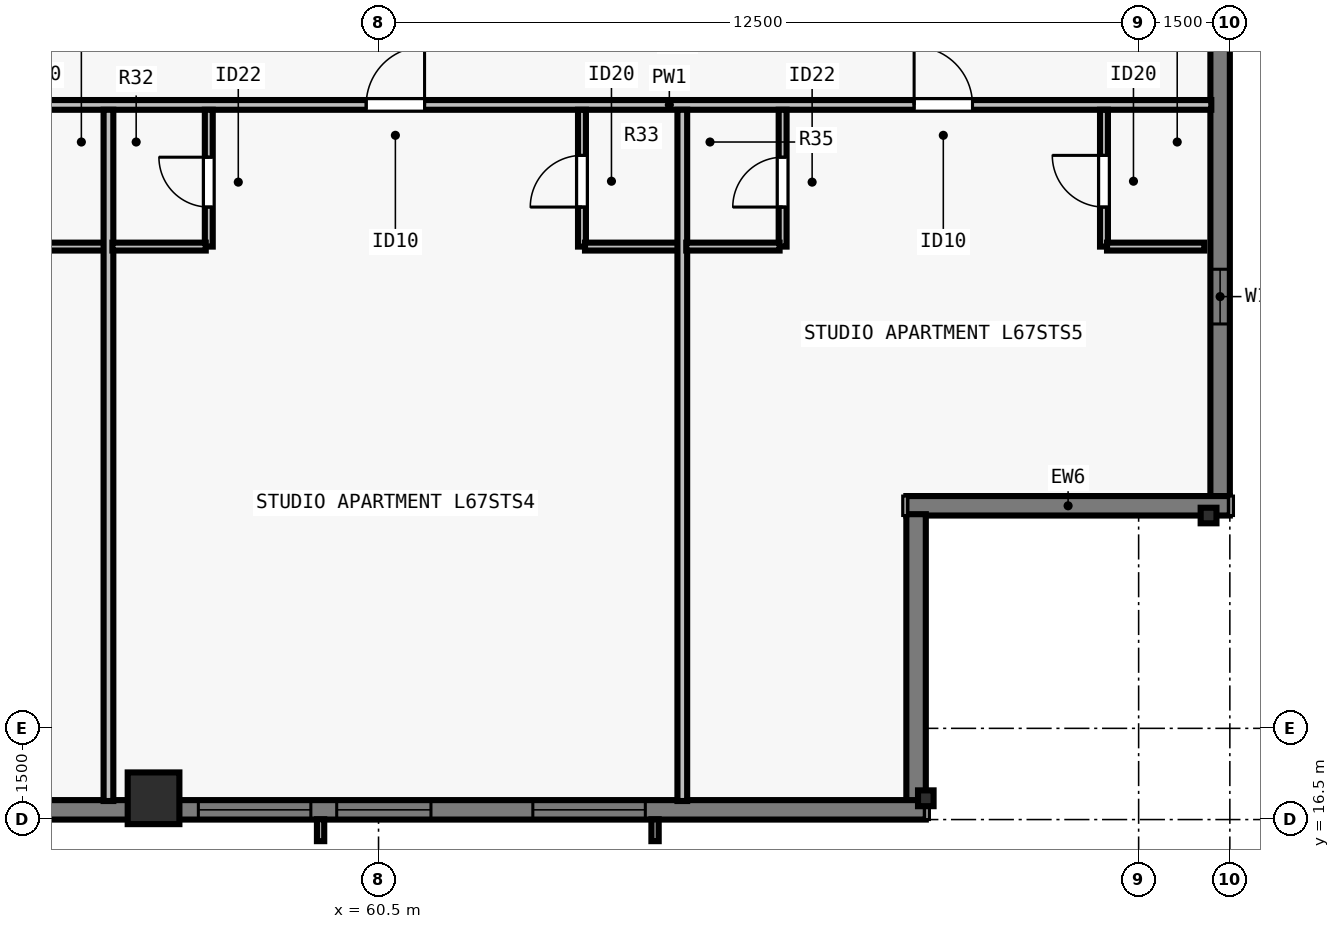
"""IFC4 building model, lengths in metres.
Left out: names, types, materials, properties, quantities, classifications, styles, units other than length and angle.
Written with IfcOpenShell. Run it as: python <this file> out.ifc"""

import sys

from ifc_helpers import new_model, si_unit, direction, frame, frame_2d, origin, origin_2d, place, context, subcontext, project, spatial, rectangle, i_section, extrude, element, fill, save


model = new_model("IFC4")
c1 = context("Model", 3, precision=1e-05, world=origin(), true_north=direction((0.0, 1.0)))
c2 = subcontext(c1, "Body", "Model", "MODEL_VIEW")
j1 = project(units=[si_unit("LENGTHUNIT", "METRE"), si_unit("PLANEANGLEUNIT", "RADIAN")], contexts=[c1])
p1 = place(None, origin())
s1 = spatial("IfcSite", under=j1, at=p1, CompositionType="ELEMENT")
p2 = place(p1, origin())
s2 = spatial("IfcBuilding", under=s1, at=p2, CompositionType="ELEMENT")
p3 = place(p2, frame((0.0, 0.0, 244.5)))
s3 = spatial("IfcBuildingStorey", under=s2, at=p3, CompositionType="ELEMENT", Elevation=244.5)
p4 = place(p3, frame((56.8, 16.85, 0.0), z_axis=(0.0, 0.0, 1.0), x_axis=(1.0, 0.0, 0.0)))
e1 = element("IfcColumn", 1, at=p4, inside=s3, PredefinedType="COLUMN", context=c2, shape_type="SweptSolid", body=[
    extrude(rectangle(XDim=0.85, YDim=0.85, at=origin_2d()), origin(), (0.0, 0.0, 1.0), 3.5),
])
for number, where, z_axis, x_axis in (
    (2, (69.5, 16.85, 0.0), (0.0, 0.0, 1.0), (1.0, 0.0, 0.0)),
    (3, (74.15, 21.5, 0.0), (0.0, 0.0, 1.0), (0.0, 1.0, 0.0)),
):
    element("IfcColumn", number, at=place(p3, frame(where, z_axis=z_axis, x_axis=x_axis)), inside=s3, PredefinedType="COLUMN", context=c2, shape_type="SweptSolid", body=[
        extrude(i_section(OverallWidth=0.256, OverallDepth=0.26, WebThickness=0.01, FlangeThickness=0.017, FilletRadius=0.013, at=origin_2d()), origin(), (0.0, 0.0, 1.0), 3.5),
    ])
p5 = place(p3, frame((74.34, 56.5, 0.0), z_axis=(0.0, 0.0, 1.0), x_axis=(0.0, -1.0, 0.0)))
e4 = element("IfcWall", 4, at=p5, inside=s3, PredefinedType="SOLIDWALL", context=c2, shape_type="SweptSolid", body=[
    extrude(rectangle(XDim=34.702, YDim=0.32, at=frame_2d((17.351, 0.0))), origin(), (0.0, 0.0, 1.0), 3.29),
])
p6 = place(p5, frame((9.388, 0.0, 0.8)))
e5 = element("IfcOpeningElement", 5, at=p6, cuts=e4, PredefinedType="OPENING", context=c2, shape_type="SweptSolid", body=[
    extrude(rectangle(XDim=1.55, YDim=1.678, at=frame_2d((0.775, 0.839))), frame((0.0, 0.17, 0.0), z_axis=(0.0, -1.0, 0.0), x_axis=(1.0, 0.0, 0.0)), (0.0, 0.0, 1.0), 0.34),
])
p7 = place(p5, frame((14.038, 0.0, 0.8)))
e6 = element("IfcOpeningElement", 6, at=p7, cuts=e4, PredefinedType="OPENING", context=c2, shape_type="SweptSolid", body=[
    extrude(rectangle(XDim=1.55, YDim=1.678, at=frame_2d((0.775, 0.839))), frame((0.0, 0.17, 0.0), z_axis=(0.0, -1.0, 0.0), x_axis=(1.0, 0.0, 0.0)), (0.0, 0.0, 1.0), 0.34),
])
p8 = place(p5, frame((18.114, 0.0, 0.8)))
e7 = element("IfcOpeningElement", 7, at=p8, cuts=e4, PredefinedType="OPENING", context=c2, shape_type="SweptSolid", body=[
    extrude(rectangle(XDim=1.85, YDim=1.678, at=frame_2d((0.925, 0.839))), frame((0.0, 0.17, 0.0), z_axis=(0.0, -1.0, 0.0), x_axis=(1.0, 0.0, 0.0)), (0.0, 0.0, 1.0), 0.34),
])
p9 = place(p5, frame((23.614, 0.0, 0.8)))
e8 = element("IfcOpeningElement", 8, at=p9, cuts=e4, PredefinedType="OPENING", context=c2, shape_type="SweptSolid", body=[
    extrude(rectangle(XDim=1.85, YDim=1.678, at=frame_2d((0.925, 0.839))), frame((0.0, 0.17, 0.0), z_axis=(0.0, -1.0, 0.0), x_axis=(1.0, 0.0, 0.0)), (0.0, 0.0, 1.0), 0.34),
])
p10 = place(p5, frame((30.95, 0.0, 0.8)))
e9 = element("IfcOpeningElement", 9, at=p10, cuts=e4, PredefinedType="OPENING", context=c2, shape_type="SweptSolid", body=[
    extrude(rectangle(XDim=0.9, YDim=1.678, at=frame_2d((0.45, 0.839))), frame((0.0, 0.17, 0.0), z_axis=(0.0, -1.0, 0.0), x_axis=(1.0, 0.0, 0.0)), (0.0, 0.0, 1.0), 0.34),
])
p11 = place(p3, frame((74.5, 21.66, 0.0), z_axis=(0.0, 0.0, 1.0), x_axis=(-1.0, 0.0, 0.0)))
e10 = element("IfcWall", 10, at=p11, inside=s3, PredefinedType="SOLIDWALL", context=c2, shape_type="SweptSolid", body=[
    extrude(rectangle(XDim=5.32, YDim=0.32, at=frame_2d((2.66, 0.0))), origin(), (0.0, 0.0, 1.0), 3.29),
])
p12 = place(p3, frame((69.34, 21.522, 0.0), z_axis=(0.0, 0.0, 1.0), x_axis=(0.0, -1.0, 0.0)))
e11 = element("IfcWall", 11, at=p12, inside=s3, PredefinedType="SOLIDWALL", context=c2, shape_type="SweptSolid", body=[
    extrude(rectangle(XDim=4.724, YDim=0.32, at=frame_2d((2.362, 0.0))), origin(), (0.0, 0.0, 1.0), 3.29),
])
p13 = place(p3, frame((69.5, 16.66, 0.0), z_axis=(0.0, 0.0, 1.0), x_axis=(-1.0, 0.0, 0.0)))
e12 = element("IfcWall", 12, at=p13, inside=s3, PredefinedType="SOLIDWALL", context=c2, shape_type="SweptSolid", body=[
    extrude(rectangle(XDim=34.702, YDim=0.32, at=frame_2d((17.351, 0.0))), origin(), (0.0, 0.0, 1.0), 3.29),
])
p14 = place(p13, frame((4.613, 0.0, 0.8)))
e13 = element("IfcOpeningElement", 13, at=p14, cuts=e12, PredefinedType="OPENING", context=c2, shape_type="SweptSolid", body=[
    extrude(rectangle(XDim=1.85, YDim=1.678, at=frame_2d((0.925, 0.839))), frame((0.0, 0.17, 0.0), z_axis=(0.0, -1.0, 0.0), x_axis=(1.0, 0.0, 0.0)), (0.0, 0.0, 1.0), 0.34),
])
p15 = place(p13, frame((8.138, 0.0, 0.8)))
e14 = element("IfcOpeningElement", 14, at=p15, cuts=e12, PredefinedType="OPENING", context=c2, shape_type="SweptSolid", body=[
    extrude(rectangle(XDim=1.55, YDim=1.678, at=frame_2d((0.775, 0.839))), frame((0.0, 0.17, 0.0), z_axis=(0.0, -1.0, 0.0), x_axis=(1.0, 0.0, 0.0)), (0.0, 0.0, 1.0), 0.34),
])
p16 = place(p13, frame((10.113, 0.0, 0.8)))
e15 = element("IfcOpeningElement", 15, at=p16, cuts=e12, PredefinedType="OPENING", context=c2, shape_type="SweptSolid", body=[
    extrude(rectangle(XDim=1.85, YDim=1.678, at=frame_2d((0.925, 0.839))), frame((0.0, 0.17, 0.0), z_axis=(0.0, -1.0, 0.0), x_axis=(1.0, 0.0, 0.0)), (0.0, 0.0, 1.0), 0.34),
])
p17 = place(p13, frame((14.888, 0.0, 0.8)))
e16 = element("IfcOpeningElement", 16, at=p17, cuts=e12, PredefinedType="OPENING", context=c2, shape_type="SweptSolid", body=[
    extrude(rectangle(XDim=1.55, YDim=1.678, at=frame_2d((0.775, 0.839))), frame((0.0, 0.17, 0.0), z_axis=(0.0, -1.0, 0.0), x_axis=(1.0, 0.0, 0.0)), (0.0, 0.0, 1.0), 0.34),
])
p18 = place(p13, frame((18.114, 0.0, 0.8)))
e17 = element("IfcOpeningElement", 17, at=p18, cuts=e12, PredefinedType="OPENING", context=c2, shape_type="SweptSolid", body=[
    extrude(rectangle(XDim=1.85, YDim=1.678, at=frame_2d((0.925, 0.839))), frame((0.0, 0.17, 0.0), z_axis=(0.0, -1.0, 0.0), x_axis=(1.0, 0.0, 0.0)), (0.0, 0.0, 1.0), 0.34),
])
p19 = place(p13, frame((24.864, 0.0, 0.8)))
e18 = element("IfcOpeningElement", 18, at=p19, cuts=e12, PredefinedType="OPENING", context=c2, shape_type="SweptSolid", body=[
    extrude(rectangle(XDim=1.85, YDim=1.678, at=frame_2d((0.925, 0.839))), frame((0.0, 0.17, 0.0), z_axis=(0.0, -1.0, 0.0), x_axis=(1.0, 0.0, 0.0)), (0.0, 0.0, 1.0), 0.34),
])
p20 = place(p13, frame((28.389, 0.0, 0.8)))
e19 = element("IfcOpeningElement", 19, at=p20, cuts=e12, PredefinedType="OPENING", context=c2, shape_type="SweptSolid", body=[
    extrude(rectangle(XDim=1.55, YDim=1.678, at=frame_2d((0.775, 0.839))), frame((0.0, 0.17, 0.0), z_axis=(0.0, -1.0, 0.0), x_axis=(1.0, 0.0, 0.0)), (0.0, 0.0, 1.0), 0.34),
])
p21 = place(p3, frame((29.805, 28.252, 0.0), z_axis=(0.0, 0.0, 1.0), x_axis=(1.0, 0.0, 0.0)))
e20 = element("IfcWall", 20, at=p21, inside=s3, PredefinedType="PARTITIONING", context=c2, shape_type="SweptSolid", body=[
    extrude(rectangle(XDim=44.39, YDim=0.16, at=frame_2d((22.195, 0.0))), origin(), (0.0, 0.0, 1.0), 2.958),
])
p22 = place(p21, frame((3.872, 0.0, 0.0)))
e21 = element("IfcOpeningElement", 21, at=p22, cuts=e20, PredefinedType="OPENING", context=c2, shape_type="SweptSolid", body=[
    extrude(rectangle(XDim=0.96, YDim=2.18, at=frame_2d((0.48, 1.09))), frame((0.0, 0.09, 0.0), z_axis=(0.0, -1.0, 0.0), x_axis=(1.0, 0.0, 0.0)), (0.0, 0.0, 1.0), 0.18),
])
p23 = place(p21, frame((12.828, 0.0, 0.0)))
e22 = element("IfcOpeningElement", 22, at=p23, cuts=e20, PredefinedType="OPENING", context=c2, shape_type="SweptSolid", body=[
    extrude(rectangle(XDim=0.96, YDim=2.18, at=frame_2d((0.48, 1.09))), frame((0.0, 0.09, 0.0), z_axis=(0.0, -1.0, 0.0), x_axis=(1.0, 0.0, 0.0)), (0.0, 0.0, 1.0), 0.18),
])
p24 = place(p21, frame((21.66, 0.0, 0.0)))
e23 = element("IfcOpeningElement", 23, at=p24, cuts=e20, PredefinedType="OPENING", context=c2, shape_type="SweptSolid", body=[
    extrude(rectangle(XDim=0.96, YDim=2.18, at=frame_2d((0.48, 1.09))), frame((0.0, 0.09, 0.0), z_axis=(0.0, -1.0, 0.0), x_axis=(1.0, 0.0, 0.0)), (0.0, 0.0, 1.0), 0.18),
])
p25 = place(p21, frame((30.492, 0.0, 0.0)))
e24 = element("IfcOpeningElement", 24, at=p25, cuts=e20, PredefinedType="OPENING", context=c2, shape_type="SweptSolid", body=[
    extrude(rectangle(XDim=0.96, YDim=2.18, at=frame_2d((0.48, 1.09))), frame((0.0, 0.09, 0.0), z_axis=(0.0, -1.0, 0.0), x_axis=(1.0, 0.0, 0.0)), (0.0, 0.0, 1.0), 0.18),
])
p26 = place(p21, frame((39.503, 0.0, 0.0)))
e25 = element("IfcOpeningElement", 25, at=p26, cuts=e20, PredefinedType="OPENING", context=c2, shape_type="SweptSolid", body=[
    extrude(rectangle(XDim=0.96, YDim=2.18, at=frame_2d((0.48, 1.09))), frame((0.0, 0.09, 0.0), z_axis=(0.0, -1.0, 0.0), x_axis=(1.0, 0.0, 0.0)), (0.0, 0.0, 1.0), 0.18),
])
p27 = place(p3, frame((54.458, 25.923, 0.0), z_axis=(0.0, 0.0, 1.0), x_axis=(1.0, 0.0, 0.0)))
e26 = element("IfcWall", 26, at=p27, inside=s3, PredefinedType="PLUMBINGWALL", context=c2, shape_type="SweptSolid", body=[
    extrude(rectangle(XDim=1.6, YDim=0.13, at=frame_2d((0.8, 0.0))), origin(), (0.0, 0.0, 1.0), 3.29),
])
p28 = place(p3, frame((56.059, 16.805, 0.0), z_axis=(0.0, 0.0, 1.0), x_axis=(0.0, 1.0, 0.0)))
e27 = element("IfcWall", 27, at=p28, inside=s3, PredefinedType="PARTITIONING", context=c2, shape_type="SweptSolid", body=[
    extrude(rectangle(XDim=11.368, YDim=0.16, at=frame_2d((5.684, 0.0))), origin(), (0.0, 0.0, 1.0), 3.29),
])
p29 = place(p3, frame((57.708, 25.923, 0.0), z_axis=(0.0, 0.0, 1.0), x_axis=(0.0, 1.0, 0.0)))
e28 = element("IfcWall", 28, at=p29, inside=s3, PredefinedType="PLUMBINGWALL", context=c2, shape_type="SweptSolid", body=[
    extrude(rectangle(XDim=2.25, YDim=0.13, at=frame_2d((1.125, 0.0))), origin(), (0.0, 0.0, 1.0), 3.29),
])
p30 = place(p29, frame((0.65, 0.0, 0.0)))
e29 = element("IfcOpeningElement", 29, at=p30, cuts=e28, PredefinedType="OPENING", context=c2, shape_type="SweptSolid", body=[
    extrude(rectangle(XDim=0.82, YDim=2.1, at=frame_2d((0.41, 1.05))), frame((0.0, 0.075, 0.0), z_axis=(0.0, -1.0, 0.0), x_axis=(1.0, 0.0, 0.0)), (0.0, 0.0, 1.0), 0.15),
])
p31 = place(p3, frame((56.124, 25.923, 0.0), z_axis=(0.0, 0.0, 1.0), x_axis=(1.0, 0.0, 0.0)))
e30 = element("IfcWall", 30, at=p31, inside=s3, PredefinedType="PLUMBINGWALL", context=c2, shape_type="SweptSolid", body=[
    extrude(rectangle(XDim=1.535, YDim=0.13, at=frame_2d((0.768, 0.0))), origin(), (0.0, 0.0, 1.0), 3.29),
])
p32 = place(p3, frame((63.845, 25.923, 0.0), z_axis=(0.0, 0.0, 1.0), x_axis=(0.0, 1.0, 0.0)))
e31 = element("IfcWall", 31, at=p32, inside=s3, PredefinedType="PLUMBINGWALL", context=c2, shape_type="SweptSolid", body=[
    extrude(rectangle(XDim=2.25, YDim=0.13, at=frame_2d((1.125, 0.0))), origin(), (0.0, 0.0, 1.0), 3.29),
])
p33 = place(p32, frame((0.65, 0.0, 0.0)))
e32 = element("IfcOpeningElement", 32, at=p33, cuts=e31, PredefinedType="OPENING", context=c2, shape_type="SweptSolid", body=[
    extrude(rectangle(XDim=0.85, YDim=2.1, at=frame_2d((0.425, 1.05))), frame((0.0, 0.075, 0.0), z_axis=(0.0, -1.0, 0.0), x_axis=(1.0, 0.0, 0.0)), (0.0, 0.0, 1.0), 0.15),
])
p34 = place(p3, frame((63.896, 25.923, 0.0), z_axis=(0.0, 0.0, 1.0), x_axis=(1.0, 0.0, 0.0)))
e33 = element("IfcWall", 33, at=p34, inside=s3, PredefinedType="PLUMBINGWALL", context=c2, shape_type="SweptSolid", body=[
    extrude(rectangle(XDim=1.6, YDim=0.13, at=frame_2d((0.8, 0.0))), origin(), (0.0, 0.0, 1.0), 3.29),
])
p35 = place(p3, frame((65.496, 16.805, 0.0), z_axis=(0.0, 0.0, 1.0), x_axis=(0.0, 1.0, 0.0)))
e34 = element("IfcWall", 34, at=p35, inside=s3, PredefinedType="PARTITIONING", context=c2, shape_type="SweptSolid", body=[
    extrude(rectangle(XDim=11.368, YDim=0.16, at=frame_2d((5.684, 0.0))), origin(), (0.0, 0.0, 1.0), 2.573),
])
p36 = place(p3, frame((67.146, 25.923, 0.0), z_axis=(0.0, 0.0, 1.0), x_axis=(0.0, 1.0, 0.0)))
e35 = element("IfcWall", 35, at=p36, inside=s3, PredefinedType="PLUMBINGWALL", context=c2, shape_type="SweptSolid", body=[
    extrude(rectangle(XDim=2.25, YDim=0.13, at=frame_2d((1.125, 0.0))), origin(), (0.0, 0.0, 1.0), 3.29),
])
p37 = place(p36, frame((0.65, 0.0, 0.0)))
e36 = element("IfcOpeningElement", 36, at=p37, cuts=e35, PredefinedType="OPENING", context=c2, shape_type="SweptSolid", body=[
    extrude(rectangle(XDim=0.82, YDim=2.1, at=frame_2d((0.41, 1.05))), frame((0.0, 0.075, 0.0), z_axis=(0.0, -1.0, 0.0), x_axis=(1.0, 0.0, 0.0)), (0.0, 0.0, 1.0), 0.15),
])
p38 = place(p3, frame((65.561, 25.923, 0.0), z_axis=(0.0, 0.0, 1.0), x_axis=(1.0, 0.0, 0.0)))
e37 = element("IfcWall", 37, at=p38, inside=s3, PredefinedType="PLUMBINGWALL", context=c2, shape_type="SweptSolid", body=[
    extrude(rectangle(XDim=1.535, YDim=0.13, at=frame_2d((0.768, 0.0))), origin(), (0.0, 0.0, 1.0), 3.29),
])
p39 = place(p3, frame((72.43, 25.923, 0.0), z_axis=(0.0, 0.0, 1.0), x_axis=(0.0, 1.0, 0.0)))
e38 = element("IfcWall", 38, at=p39, inside=s3, PredefinedType="PLUMBINGWALL", context=c2, shape_type="SweptSolid", body=[
    extrude(rectangle(XDim=2.25, YDim=0.13, at=frame_2d((1.125, 0.0))), origin(), (0.0, 0.0, 1.0), 3.29),
])
p40 = place(p39, frame((0.65, 0.0, 0.0)))
e39 = element("IfcOpeningElement", 39, at=p40, cuts=e38, PredefinedType="OPENING", context=c2, shape_type="SweptSolid", body=[
    extrude(rectangle(XDim=0.85, YDim=2.1, at=frame_2d((0.425, 1.05))), frame((0.0, 0.075, 0.0), z_axis=(0.0, -1.0, 0.0), x_axis=(1.0, 0.0, 0.0)), (0.0, 0.0, 1.0), 0.15),
])
p41 = place(p3, frame((72.48, 25.923, 0.0), z_axis=(0.0, 0.0, 1.0), x_axis=(1.0, 0.0, 0.0)))
e40 = element("IfcWall", 40, at=p41, inside=s3, PredefinedType="PLUMBINGWALL", context=c2, shape_type="SweptSolid", body=[
    extrude(rectangle(XDim=1.6, YDim=0.13, at=frame_2d((0.8, 0.0))), origin(), (0.0, 0.0, 1.0), 3.29),
])
p42 = place(p14, origin())
e41 = element("IfcWindow", 41, at=p42, inside=s3, PartitioningType="SINGLE_PANEL", PredefinedType="WINDOW", context=c2, shape_type="SweptSolid", body=[
    extrude(rectangle(XDim=1.85, YDim=1.678, at=frame_2d((0.925, 0.839))), frame((0.0, -0.05, 0.0), z_axis=(0.0, -1.0, 0.0), x_axis=(1.0, 0.0, 0.0)), (0.0, 0.0, 1.0), 0.06),
])
fill(e13, e41)
p43 = place(p15, origin())
e42 = element("IfcWindow", 42, at=p43, inside=s3, PartitioningType="SINGLE_PANEL", PredefinedType="WINDOW", context=c2, shape_type="SweptSolid", body=[
    extrude(rectangle(XDim=1.55, YDim=1.678, at=frame_2d((0.775, 0.839))), frame((0.0, -0.05, 0.0), z_axis=(0.0, -1.0, 0.0), x_axis=(1.0, 0.0, 0.0)), (0.0, 0.0, 1.0), 0.06),
])
fill(e14, e42)
p44 = place(p16, origin())
e43 = element("IfcWindow", 43, at=p44, inside=s3, PartitioningType="SINGLE_PANEL", PredefinedType="WINDOW", context=c2, shape_type="SweptSolid", body=[
    extrude(rectangle(XDim=1.85, YDim=1.678, at=frame_2d((0.925, 0.839))), frame((0.0, -0.05, 0.0), z_axis=(0.0, -1.0, 0.0), x_axis=(1.0, 0.0, 0.0)), (0.0, 0.0, 1.0), 0.06),
])
fill(e15, e43)
p45 = place(p10, origin())
e44 = element("IfcWindow", 44, at=p45, inside=s3, PartitioningType="SINGLE_PANEL", PredefinedType="WINDOW", context=c2, shape_type="SweptSolid", body=[
    extrude(rectangle(XDim=0.9, YDim=1.678, at=frame_2d((0.45, 0.839))), frame((0.0, -0.04, 0.0), z_axis=(0.0, -1.0, 0.0), x_axis=(1.0, 0.0, 0.0)), (0.0, 0.0, 1.0), 0.06),
])
fill(e9, e44)
p46 = place(p30, origin())
e45 = element("IfcDoor", 45, at=p46, inside=s3, OperationType="SINGLE_SWING_RIGHT", PredefinedType="DOOR", context=c2, shape_type="SweptSolid", body=[
    extrude(rectangle(XDim=0.82, YDim=2.1, at=frame_2d((0.41, 1.05))), frame((0.0, 0.025, 0.0), z_axis=(0.0, -1.0, 0.0), x_axis=(1.0, 0.0, 0.0)), (0.0, 0.0, 1.0), 0.05),
])
fill(e29, e45)
p47 = place(p33, origin())
e46 = element("IfcDoor", 46, at=p47, inside=s3, OperationType="SINGLE_SWING_LEFT", PredefinedType="DOOR", context=c2, shape_type="SweptSolid", body=[
    extrude(rectangle(XDim=0.85, YDim=2.1, at=frame_2d((0.425, 1.05))), frame((0.0, 0.025, 0.0), z_axis=(0.0, -1.0, 0.0), x_axis=(1.0, 0.0, 0.0)), (0.0, 0.0, 1.0), 0.05),
])
fill(e32, e46)
p48 = place(p25, origin())
e47 = element("IfcDoor", 47, at=p48, inside=s3, OperationType="SINGLE_SWING_RIGHT", PredefinedType="DOOR", context=c2, shape_type="SweptSolid", body=[
    extrude(rectangle(XDim=0.96, YDim=2.18, at=frame_2d((0.48, 1.09))), frame((0.0, 0.025, 0.0), z_axis=(0.0, -1.0, 0.0), x_axis=(1.0, 0.0, 0.0)), (0.0, 0.0, 1.0), 0.05),
])
fill(e24, e47)
p49 = place(p37, origin())
e48 = element("IfcDoor", 48, at=p49, inside=s3, OperationType="SINGLE_SWING_LEFT", PredefinedType="DOOR", context=c2, shape_type="SweptSolid", body=[
    extrude(rectangle(XDim=0.82, YDim=2.1, at=frame_2d((0.41, 1.05))), frame((0.0, 0.025, 0.0), z_axis=(0.0, -1.0, 0.0), x_axis=(1.0, 0.0, 0.0)), (0.0, 0.0, 1.0), 0.05),
])
fill(e36, e48)
p50 = place(p40, origin())
e49 = element("IfcDoor", 49, at=p50, inside=s3, OperationType="SINGLE_SWING_RIGHT", PredefinedType="DOOR", context=c2, shape_type="SweptSolid", body=[
    extrude(rectangle(XDim=0.85, YDim=2.1, at=frame_2d((0.425, 1.05))), frame((0.0, 0.025, 0.0), z_axis=(0.0, -1.0, 0.0), x_axis=(1.0, 0.0, 0.0)), (0.0, 0.0, 1.0), 0.05),
])
fill(e39, e49)
p51 = place(p26, origin())
e50 = element("IfcDoor", 50, at=p51, inside=s3, OperationType="SINGLE_SWING_LEFT", PredefinedType="DOOR", context=c2, shape_type="SweptSolid", body=[
    extrude(rectangle(XDim=0.96, YDim=2.18, at=frame_2d((0.48, 1.09))), frame((0.0, 0.025, 0.0), z_axis=(0.0, -1.0, 0.0), x_axis=(1.0, 0.0, 0.0)), (0.0, 0.0, 1.0), 0.05),
])
fill(e25, e50)
save(model, sys.argv[1])
